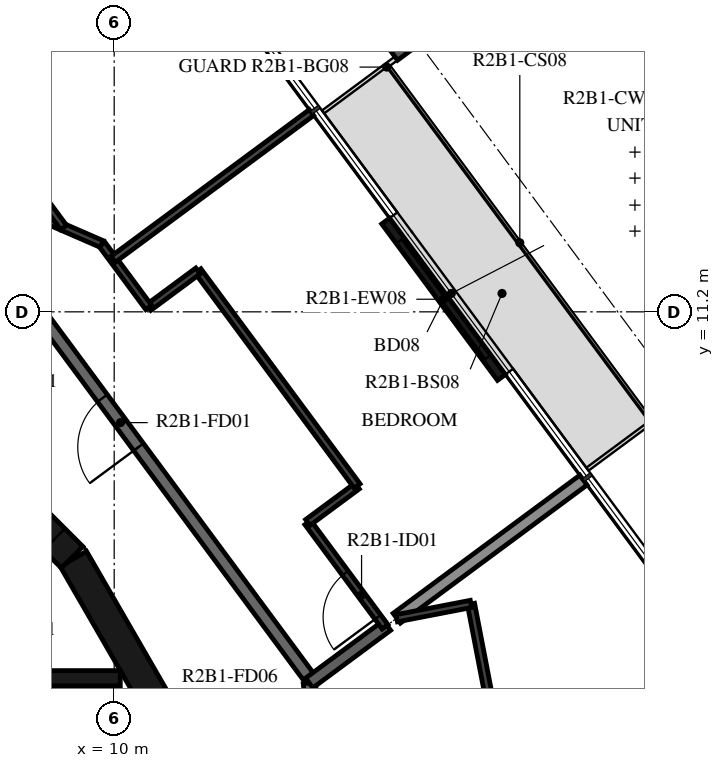
"""IFC4 building model, lengths in metres.
Left out: names, types, materials, properties, quantities, classifications, styles, units other than length and angle.
Written with IfcOpenShell. Run it as: python <this file> out.ifc"""

import sys

from ifc_helpers import new_model, si_unit, direction, frame, frame_2d, origin, origin_2d, place, context, subcontext, project, spatial, polyline, rectangle, i_section, outline, extrude, element, fill, save


model = new_model("IFC4")
c1 = context("Model", 3, precision=1e-05, world=origin(), true_north=direction((0.0, 1.0)))
c2 = subcontext(c1, "Body", "Model", "MODEL_VIEW")
j1 = project(units=[si_unit("LENGTHUNIT", "METRE"), si_unit("PLANEANGLEUNIT", "RADIAN")], contexts=[c1])
p1 = place(None, origin())
s1 = spatial("IfcSite", under=j1, at=p1, CompositionType="ELEMENT")
p2 = place(p1, origin())
s2 = spatial("IfcBuilding", under=s1, at=p2, CompositionType="ELEMENT")
p3 = place(p2, frame((0.0, 0.0, 87.2)))
s3 = spatial("IfcBuildingStorey", under=s2, at=p3, CompositionType="ELEMENT", Elevation=87.2)
p4 = place(p3, frame((14.932, 15.726, -0.38), z_axis=(0.0, 0.0, 1.0), x_axis=(0.594822857897, -0.803856807972, 0.0)))
e1 = element("IfcColumn", 1, at=p4, inside=s3, PredefinedType="COLUMN", context=c2, shape_type="SweptSolid", body=[
    extrude(i_section(OverallWidth=0.3, OverallDepth=0.9, WebThickness=0.019, FlangeThickness=0.035, FilletRadius=0.03, at=origin_2d()), origin(), (0.0, 0.0, 1.0), 3.5),
])
p5 = place(p3, frame((16.368, 10.121, 0.0), z_axis=(0.0, 0.0, 1.0), x_axis=(-0.594811452818, 0.803865247163, 0.0)))
e2 = element("IfcWall", 2, at=p5, inside=s3, PredefinedType="STANDARD", context=c2, shape_type="SweptSolid", body=[
    extrude(rectangle(XDim=3.2, YDim=0.16, at=frame_2d((1.6, 0.0))), origin(), (0.0, 0.0, 1.0), 3.12),
])
p6 = place(p5, frame((0.4, 0.0, 0.0)))
e3 = element("IfcOpeningElement", 3, at=p6, cuts=e2, PredefinedType="OPENING", context=c2, shape_type="SweptSolid", body=[
    extrude(rectangle(XDim=2.4, YDim=2.4, at=frame_2d((1.2, 1.2))), frame((0.0, 0.09, 0.0), z_axis=(0.0, -1.0, 0.0), x_axis=(1.0, 0.0, 0.0)), (0.0, 0.0, 1.0), 0.18),
])
p7 = place(p3, frame((10.845, 4.51, 0.0), z_axis=(0.0, 0.0, 1.0), x_axis=(-0.500087131594, 0.865975092491, 0.0)))
e4 = element("IfcWall", 4, at=p7, inside=s3, PredefinedType="SHEAR", context=c2, shape_type="SweptSolid", body=[
    extrude(rectangle(XDim=3.033, YDim=0.5, at=frame_2d((1.516, 0.0))), origin(), (0.0, 0.0, 1.0), 3.12),
])
p8 = place(p3, frame((9.308, 7.164, 0.0), z_axis=(0.0, 0.0, 1.0), x_axis=(-0.707106781187, 0.707106781187, 0.0)))
e5 = element("IfcWall", 5, at=p8, inside=s3, PredefinedType="SHEAR", context=c2, shape_type="SweptSolid", body=[
    extrude(rectangle(XDim=3.032, YDim=0.5, at=frame_2d((1.516, 0.0))), origin(), (0.0, 0.0, 1.0), 3.12),
])
p9 = place(p8, frame((0.416, 0.0, 0.0)))
e6 = element("IfcOpeningElement", 6, at=p9, cuts=e5, PredefinedType="OPENING", context=c2, shape_type="SweptSolid", body=[
    extrude(rectangle(XDim=1.2, YDim=2.1, at=frame_2d((0.6, 1.05))), frame((0.0, 0.26, 0.0), z_axis=(0.0, -1.0, 0.0), x_axis=(1.0, 0.0, 0.0)), (0.0, 0.0, 1.0), 0.52),
])
p10 = place(p3, frame((7.0, 5.175, 0.0), z_axis=(0.0, 0.0, 1.0), x_axis=(1.0, 0.0, 0.0)))
e7 = element("IfcWall", 7, at=p10, inside=s3, PredefinedType="SHEAR", context=c2, shape_type="SweptSolid", body=[
    extrude(rectangle(XDim=3.1, YDim=0.25, at=frame_2d((1.55, 0.0))), origin(), (0.0, 0.0, 1.0), 3.12),
])
p11 = place(p3, origin())
e8 = element("IfcWall", 8, at=p11, inside=s3, PredefinedType="SHEAR", context=c2, shape_type="SweptSolid", body=[
    extrude(outline(polyline([(-9.55, 4.8), (-7.65, 4.8), (-7.65, 1.9), (-7.4, 1.9), (-7.4, 4.8), (-5.5, 4.8), (-5.5, 1.9), (-5.25, 1.9), (-5.25, 4.8), (-3.35, 4.8), (-3.35, 1.9), (-3.1, 1.9), (-3.1, 4.8), (-1.2, 4.8), (-1.2, 1.9), (-0.95, 1.9), (-0.95, 4.8), (0.95, 4.8), (0.95, 1.9), (1.2, 1.9), (1.2, 4.8), (3.1, 4.8), (3.1, 1.9), (3.35, 1.9), (3.35, 4.8), (5.25, 4.8), (5.25, 1.9), (5.5, 1.9), (5.5, 4.8), (7.4, 4.8), (7.4, 1.9), (7.65, 1.9), (7.65, 4.8), (9.55, 4.8), (9.55, 1.9), (9.8, 1.9), (9.8, 4.8), (9.8, 5.05), (-9.8, 5.05), (-9.8, 4.8), (-9.8, 1.9), (-9.55, 1.9), (-9.55, 4.8)])), origin(), (0.0, 0.0, 1.0), 3.12),
])
p12 = place(p3, frame((13.196, 5.198, 0.0), z_axis=(0.0, 0.0, 1.0), x_axis=(-0.594805187394, 0.803869883159, 0.0)))
e9 = element("IfcWall", 9, at=p12, inside=s3, PredefinedType="STANDARD", context=c2, shape_type="SweptSolid", body=[
    extrude(rectangle(XDim=7.342, YDim=0.2, at=frame_2d((3.671, 0.0))), origin(), (0.0, 0.0, 1.0), 3.12),
])
p13 = place(p12, frame((4.7, 0.0, 0.0)))
e10 = element("IfcOpeningElement", 10, at=p13, cuts=e9, PredefinedType="OPENING", context=c2, shape_type="SweptSolid", body=[
    extrude(rectangle(XDim=1.0, YDim=2.1, at=frame_2d((0.5, 1.05))), frame((0.0, 0.11, 0.0), z_axis=(0.0, -1.0, 0.0), x_axis=(1.0, 0.0, 0.0)), (0.0, 0.0, 1.0), 0.22),
])
p14 = place(p3, frame((14.028, -2.096, 0.0), z_axis=(0.0, 0.0, 1.0), x_axis=(-0.113207047924, 0.993571418822, 0.0)))
e11 = element("IfcWall", 11, at=p14, inside=s3, PredefinedType="STANDARD", context=c2, shape_type="SweptSolid", body=[
    extrude(rectangle(XDim=7.24, YDim=0.2, at=frame_2d((3.62, 0.0))), origin(), (0.0, 0.0, 1.0), 3.12),
])
p15 = place(p14, frame((6.04, 0.0, 0.0)))
e12 = element("IfcOpeningElement", 12, at=p15, cuts=e11, PredefinedType="OPENING", context=c2, shape_type="SweptSolid", body=[
    extrude(rectangle(XDim=1.0, YDim=2.1, at=frame_2d((0.5, 1.05))), frame((0.0, 0.11, 0.0), z_axis=(0.0, -1.0, 0.0), x_axis=(1.0, 0.0, 0.0)), (0.0, 0.0, 1.0), 0.22),
])
p16 = place(p3, frame((13.208, 5.097, 0.0), z_axis=(0.0, 0.0, 1.0), x_axis=(0.803831627965, 0.594856885211, 0.0)))
e13 = element("IfcWall", 13, at=p16, inside=s3, PredefinedType="STANDARD", context=c2, shape_type="SweptSolid", body=[
    extrude(rectangle(XDim=1.591, YDim=0.2, at=frame_2d((0.796, 0.0))), origin(), (0.0, 0.0, 1.0), 3.12),
])
p17 = place(p3, frame((14.647, 6.161, 0.0), z_axis=(0.0, 0.0, 1.0), x_axis=(0.803842510616, 0.594842179175, 0.0)))
e14 = element("IfcWall", 14, at=p17, inside=s3, PredefinedType="STANDARD", context=c2, shape_type="SweptSolid", body=[
    extrude(rectangle(XDim=3.819, YDim=0.2, at=frame_2d((1.909, 0.0))), origin(), (0.0, 0.0, 1.0), 2.73),
])
p18 = place(p3, frame((14.455, 6.019, 0.0), z_axis=(0.0, 0.0, 1.0), x_axis=(-0.594792774379, 0.803879067737, 0.0)))
e15 = element("IfcWall", 15, at=p18, inside=s3, PredefinedType="PARTITIONING", context=c2, shape_type="SweptSolid", body=[
    extrude(rectangle(XDim=2.136, YDim=0.12, at=frame_2d((1.068, 0.0))), origin(), (0.0, 0.0, 1.0), 3.12),
])
p19 = place(p18, frame((0.2, 0.0, 0.0)))
e16 = element("IfcOpeningElement", 16, at=p19, cuts=e15, PredefinedType="OPENING", context=c2, shape_type="SweptSolid", body=[
    extrude(rectangle(XDim=0.9, YDim=2.1, at=frame_2d((0.45, 1.05))), frame((0.0, 0.07, 0.0), z_axis=(0.0, -1.0, 0.0), x_axis=(1.0, 0.0, 0.0)), (0.0, 0.0, 1.0), 0.14),
])
p20 = place(p3, frame((13.185, 7.736, 0.0), z_axis=(0.0, 0.0, 1.0), x_axis=(0.803934518159, 0.594717824277, 0.0)))
e17 = element("IfcWall", 17, at=p20, inside=s3, PredefinedType="PARTITIONING", context=c2, shape_type="SweptSolid", body=[
    extrude(rectangle(XDim=1.008, YDim=0.12, at=frame_2d((0.504, 0.0))), origin(), (0.0, 0.0, 1.0), 3.12),
])
p21 = place(p3, frame((13.995, 8.336, 0.0), z_axis=(0.0, 0.0, 1.0), x_axis=(-0.59480284986, 0.803871612758, 0.0)))
e18 = element("IfcWall", 18, at=p21, inside=s3, PredefinedType="PARTITIONING", context=c2, shape_type="SweptSolid", body=[
    extrude(rectangle(XDim=4.4, YDim=0.12, at=frame_2d((2.2, 0.0))), origin(), (0.0, 0.0, 1.0), 3.12),
])
p22 = place(p3, frame((11.378, 11.873, 0.0), z_axis=(0.0, 0.0, 1.0), x_axis=(-0.803818744753, -0.594874293934, 0.0)))
e19 = element("IfcWall", 19, at=p22, inside=s3, PredefinedType="PARTITIONING", context=c2, shape_type="SweptSolid", body=[
    extrude(rectangle(XDim=1.008, YDim=0.12, at=frame_2d((0.504, 0.0))), origin(), (0.0, 0.0, 1.0), 3.12),
])
p23 = place(p3, frame((10.567, 11.273, 0.0), z_axis=(0.0, 0.0, 1.0), x_axis=(-0.594957357743, 0.803757265888, 0.0)))
e20 = element("IfcWall", 20, at=p23, inside=s3, PredefinedType="PARTITIONING", context=c2, shape_type="SweptSolid", body=[
    extrude(rectangle(XDim=1.297, YDim=0.12, at=frame_2d((0.648, 0.0))), origin(), (0.0, 0.0, 1.0), 3.12),
])
p24 = place(p3, frame((9.796, 12.315, 0.0), z_axis=(0.0, 0.0, 1.0), x_axis=(-0.917053660722, 0.398763819017, 0.0)))
e21 = element("IfcWall", 21, at=p24, inside=s3, PredefinedType="PARTITIONING", context=c2, shape_type="SweptSolid", body=[
    extrude(rectangle(XDim=7.576, YDim=0.12, at=frame_2d((3.788, 0.0))), origin(), (0.0, 0.0, 1.0), 3.12),
])
p25 = place(p24, frame((2.185, 0.0, 0.0)))
e22 = element("IfcOpeningElement", 22, at=p25, cuts=e21, PredefinedType="OPENING", context=c2, shape_type="SweptSolid", body=[
    extrude(rectangle(XDim=0.8, YDim=2.1, at=frame_2d((0.4, 1.05))), frame((0.0, 0.07, 0.0), z_axis=(0.0, -1.0, 0.0), x_axis=(1.0, 0.0, 0.0)), (0.0, 0.0, 1.0), 0.14),
])
p26 = place(p3, frame((13.244, 14.477, 0.0), z_axis=(0.0, 0.0, 1.0), x_axis=(-0.803853407146, -0.594827453821, 0.0)))
e23 = element("IfcWall", 23, at=p26, inside=s3, PredefinedType="PARTITIONING", context=c2, shape_type="SweptSolid", body=[
    extrude(rectangle(XDim=4.058, YDim=0.12, at=frame_2d((2.029, 0.0))), origin(), (0.0, 0.0, 1.0), 2.73),
])
p27 = place(p3, frame((6.746, 15.862, 0.0), z_axis=(0.0, 0.0, 1.0), x_axis=(0.594836031811, -0.80384705962, 0.0)))
e24 = element("IfcWall", 24, at=p27, inside=s3, PredefinedType="PARTITIONING", context=c2, shape_type="SweptSolid", body=[
    extrude(rectangle(XDim=4.072, YDim=0.12, at=frame_2d((2.036, 0.0))), origin(), (0.0, 0.0, 1.0), 3.12),
])
p28 = place(p3, frame((16.189, 4.728, 0.0), z_axis=(0.0, 0.0, 1.0), x_axis=(-0.18942796612, 0.981894620441, 0.0)))
e25 = element("IfcWall", 25, at=p28, inside=s3, PredefinedType="PARTITIONING", context=c2, shape_type="SweptSolid", body=[
    extrude(rectangle(XDim=1.7, YDim=0.12, at=frame_2d((0.85, 0.0))), origin(), (0.0, 0.0, 1.0), 3.12),
])
p29 = place(p3, frame((15.867, 6.397, 0.0), z_axis=(0.0, 0.0, 1.0), x_axis=(-0.981909648822, -0.189350050303, 0.0)))
e26 = element("IfcWall", 26, at=p29, inside=s3, PredefinedType="PARTITIONING", context=c2, shape_type="SweptSolid", body=[
    extrude(rectangle(XDim=1.243, YDim=0.12, at=frame_2d((0.622, 0.0))), origin(), (0.0, 0.0, 1.0), 3.12),
])
p30 = place(p6, origin())
e27 = element("IfcDoor", 27, at=p30, inside=s3, OperationType="DOUBLE_DOOR_SLIDING", PredefinedType="DOOR", context=c2, shape_type="SweptSolid", body=[
    extrude(rectangle(XDim=2.4, YDim=2.4, at=frame_2d((1.2, 1.2))), frame((0.0, 0.025, 0.0), z_axis=(0.0, -1.0, 0.0), x_axis=(1.0, 0.0, 0.0)), (0.0, 0.0, 1.0), 0.05),
])
fill(e3, e27)
p31 = place(p9, origin())
e28 = element("IfcDoor", 28, at=p31, inside=s3, OperationType="SINGLE_SWING_RIGHT", PredefinedType="DOOR", context=c2, shape_type="SweptSolid", body=[
    extrude(rectangle(XDim=1.2, YDim=2.1, at=frame_2d((0.6, 1.05))), frame((0.0, 0.025, 0.0), z_axis=(0.0, -1.0, 0.0), x_axis=(1.0, 0.0, 0.0)), (0.0, 0.0, 1.0), 0.05),
])
fill(e6, e28)
p32 = place(p13, origin())
e29 = element("IfcDoor", 29, at=p32, inside=s3, OperationType="SINGLE_SWING_RIGHT", PredefinedType="DOOR", context=c2, shape_type="SweptSolid", body=[
    extrude(rectangle(XDim=1.0, YDim=2.1, at=frame_2d((0.5, 1.05))), frame((0.0, 0.025, 0.0), z_axis=(0.0, -1.0, 0.0), x_axis=(1.0, 0.0, 0.0)), (0.0, 0.0, 1.0), 0.05),
])
fill(e10, e29)
p33 = place(p19, origin())
e30 = element("IfcDoor", 30, at=p33, inside=s3, OperationType="SINGLE_SWING_LEFT", PredefinedType="DOOR", context=c2, shape_type="SweptSolid", body=[
    extrude(rectangle(XDim=0.9, YDim=2.1, at=frame_2d((0.45, 1.05))), frame((0.0, 0.025, 0.0), z_axis=(0.0, -1.0, 0.0), x_axis=(1.0, 0.0, 0.0)), (0.0, 0.0, 1.0), 0.05),
])
fill(e16, e30)
save(model, sys.argv[1])
